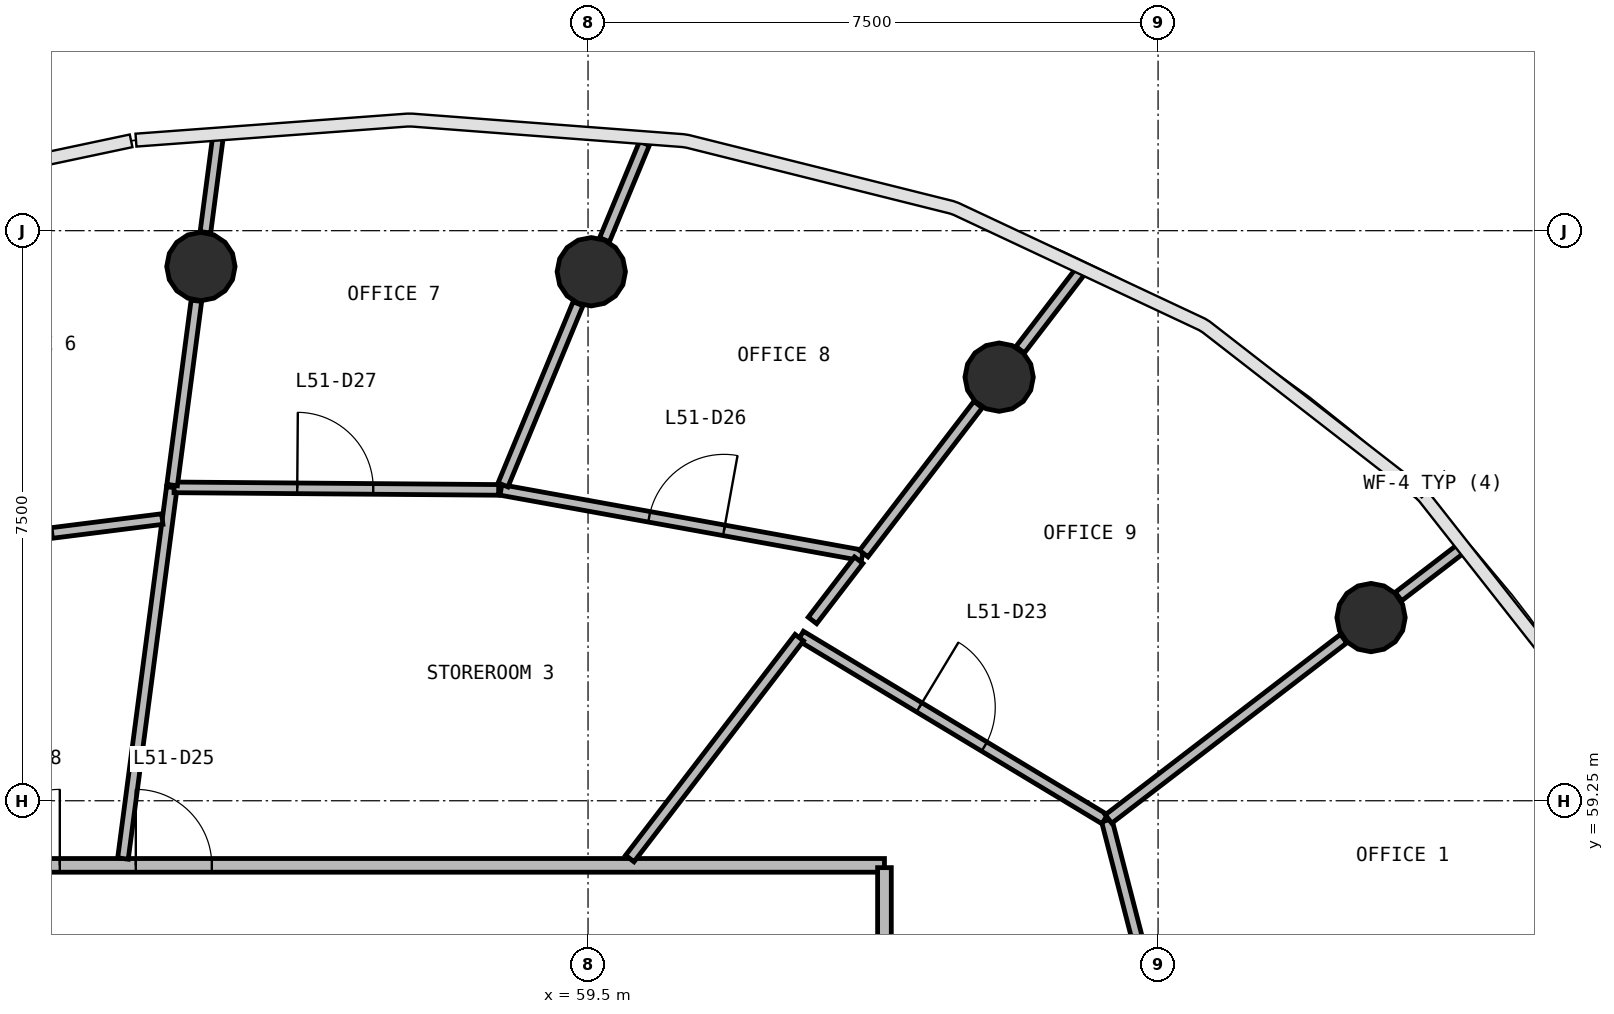
"""IFC4 building model, lengths in metres.
Left out: names, types, materials, properties, quantities, classifications, styles, units other than length and angle.
Written with IfcOpenShell. Run it as: python <this file> out.ifc"""

import sys

from ifc_helpers import new_model, si_unit, direction, frame, frame_2d, origin, origin_2d, place, context, subcontext, project, spatial, rectangle, circle, extrude, source, transform, mapped, element, fill, save


model = new_model("IFC4")
c1 = context("Model", 3, precision=1e-05, world=origin(), true_north=direction((0.0, 1.0)))
c2 = subcontext(c1, "Body", "Model", "MODEL_VIEW")
j1 = project(units=[si_unit("LENGTHUNIT", "METRE"), si_unit("PLANEANGLEUNIT", "RADIAN")], contexts=[c1])
p1 = place(None, origin())
s1 = spatial("IfcSite", under=j1, at=p1, CompositionType="ELEMENT")
p2 = place(p1, origin())
s2 = spatial("IfcBuilding", under=s1, at=p2, CompositionType="ELEMENT")
p3 = place(p2, frame((0.0, 0.0, 211.1)))
s3 = spatial("IfcBuildingStorey", under=s2, at=p3, CompositionType="ELEMENT", Elevation=211.1)
m1 = source(origin(), c2, "Body", "SweptSolid", [
    extrude(circle(Radius=0.45, at=origin_2d()), origin(), (0.0, 0.0, 1.0), 3.9),
])
for number, where, z_axis, x_axis in (
    (1, (69.802, 61.66, 0.0), (0.0, 0.0, 1.0), (1.0, 0.0, 0.0)),
    (2, (64.909, 64.823, 0.0), (0.0, 0.0, 1.0), (1.0, 0.0, 0.0)),
    (3, (59.543, 66.21, 0.0), (0.0, 0.0, 1.0), (1.0, 0.0, 0.0)),
    (4, (54.406, 66.278, 0.0), (0.0, 0.0, 1.0), (1.0, 0.0, 0.0)),
):
    element("IfcColumn", number, at=place(p3, frame(where, z_axis=z_axis, x_axis=x_axis)), inside=s3, PredefinedType="COLUMN", context=c2, shape_type="MappedRepresentation", body=[
        mapped(m1, transform((0.0, 0.0, 0.0), scale=1.0)),
    ])
p4 = place(p3, frame((40.6, 58.4, 0.0), z_axis=(0.0, 0.0, 1.0), x_axis=(1.0, 0.0, 0.0)))
e5 = element("IfcWall", 5, at=p4, inside=s3, PredefinedType="PARTITIONING", context=c2, shape_type="SweptSolid", body=[
    extrude(rectangle(XDim=22.8, YDim=0.18, at=frame_2d((11.4, 0.0))), origin(), (0.0, 0.0, 1.0), 2.88),
])
p5 = place(p4, frame((12.95, 0.0, 0.0)))
e6 = element("IfcOpeningElement", 6, at=p5, cuts=e5, PredefinedType="OPENING", context=c2, shape_type="SweptSolid", body=[
    extrude(rectangle(XDim=1.0, YDim=2.1, at=frame_2d((0.5, 1.05))), frame((0.0, 0.1, 0.0), z_axis=(0.0, -1.0, 0.0), x_axis=(1.0, 0.0, 0.0)), (0.0, 0.0, 1.0), 0.2),
])
p6 = place(p4, frame((10.95, 0.0, 0.0)))
e7 = element("IfcOpeningElement", 7, at=p6, cuts=e5, PredefinedType="OPENING", context=c2, shape_type="SweptSolid", body=[
    extrude(rectangle(XDim=1.0, YDim=2.1, at=frame_2d((0.5, 1.05))), frame((0.0, 0.1, 0.0), z_axis=(0.0, -1.0, 0.0), x_axis=(1.0, 0.0, 0.0)), (0.0, 0.0, 1.0), 0.2),
])
p7 = place(p3, frame((63.4, 58.37, 0.0), z_axis=(0.0, 0.0, 1.0), x_axis=(0.0, -1.0, 0.0)))
e8 = element("IfcWall", 8, at=p7, inside=s3, PredefinedType="PARTITIONING", context=c2, shape_type="SweptSolid", body=[
    extrude(rectangle(XDim=20.74, YDim=0.18, at=frame_2d((10.37, 0.0))), origin(), (0.0, 0.0, 1.0), 2.88),
])
p8 = place(p7, frame((9.99, 0.0, 0.0)))
e9 = element("IfcOpeningElement", 9, at=p8, cuts=e8, PredefinedType="OPENING", context=c2, shape_type="SweptSolid", body=[
    extrude(rectangle(XDim=0.9, YDim=2.1, at=frame_2d((0.45, 1.05))), frame((0.0, 0.1, 0.0), z_axis=(0.0, -1.0, 0.0), x_axis=(1.0, 0.0, 0.0)), (0.0, 0.0, 1.0), 0.2),
])
p9 = place(p7, frame((7.79, 0.0, 0.0)))
e10 = element("IfcOpeningElement", 10, at=p9, cuts=e8, PredefinedType="OPENING", context=c2, shape_type="SweptSolid", body=[
    extrude(rectangle(XDim=0.9, YDim=2.1, at=frame_2d((0.45, 1.05))), frame((0.0, 0.1, 0.0), z_axis=(0.0, -1.0, 0.0), x_axis=(1.0, 0.0, 0.0)), (0.0, 0.0, 1.0), 0.2),
])
p10 = place(p7, frame((4.29, 0.0, 0.0)))
e11 = element("IfcOpeningElement", 11, at=p10, cuts=e8, PredefinedType="OPENING", context=c2, shape_type="SweptSolid", body=[
    extrude(rectangle(XDim=1.0, YDim=2.1, at=frame_2d((0.5, 1.05))), frame((0.0, 0.1, 0.0), z_axis=(0.0, -1.0, 0.0), x_axis=(1.0, 0.0, 0.0)), (0.0, 0.0, 1.0), 0.2),
])
p11 = place(p7, frame((15.49, 0.0, 0.0)))
e12 = element("IfcOpeningElement", 12, at=p11, cuts=e8, PredefinedType="OPENING", context=c2, shape_type="SweptSolid", body=[
    extrude(rectangle(XDim=1.0, YDim=2.1, at=frame_2d((0.5, 1.05))), frame((0.0, 0.1, 0.0), z_axis=(0.0, -1.0, 0.0), x_axis=(1.0, 0.0, 0.0)), (0.0, 0.0, 1.0), 0.2),
])
p12 = place(p7, frame((12.09, 0.0, 0.0)))
e13 = element("IfcOpeningElement", 13, at=p12, cuts=e8, PredefinedType="OPENING", context=c2, shape_type="SweptSolid", body=[
    extrude(rectangle(XDim=1.0, YDim=2.1, at=frame_2d((0.5, 1.05))), frame((0.0, 0.1, 0.0), z_axis=(0.0, -1.0, 0.0), x_axis=(1.0, 0.0, 0.0)), (0.0, 0.0, 1.0), 0.2),
])
p13 = place(p3, frame((53.381, 58.49, 0.0), z_axis=(0.0, 0.0, 1.0), x_axis=(0.130510929427, 0.991446870639, 0.0)))
e14 = element("IfcWall", 14, at=p13, inside=s3, PredefinedType="PARTITIONING", context=c2, shape_type="SweptSolid", body=[
    extrude(rectangle(XDim=4.926, YDim=0.14, at=frame_2d((2.463, 0.0))), origin(), (0.0, 0.0, 1.0), 2.88),
])
p14 = place(p3, frame((58.354, 63.339, 0.0), z_axis=(0.0, 0.0, 1.0), x_axis=(0.983980456021, -0.178276364581, 0.0)))
e15 = element("IfcWall", 15, at=p14, inside=s3, PredefinedType="PARTITIONING", context=c2, shape_type="SweptSolid", body=[
    extrude(rectangle(XDim=4.833, YDim=0.14, at=frame_2d((2.417, 0.0))), origin(), (0.0, 0.0, 1.0), 2.88),
])
p15 = place(p14, frame((1.983, 0.0, 0.0)))
e16 = element("IfcOpeningElement", 16, at=p15, cuts=e15, PredefinedType="OPENING", context=c2, shape_type="SweptSolid", body=[
    extrude(rectangle(XDim=1.0, YDim=2.1, at=frame_2d((0.5, 1.05))), frame((0.0, 0.08, 0.0), z_axis=(0.0, -1.0, 0.0), x_axis=(1.0, 0.0, 0.0)), (0.0, 0.0, 1.0), 0.16),
])
p16 = place(p3, frame((66.324, 58.991, 0.0), z_axis=(0.0, 0.0, 1.0), x_axis=(0.249819251726, -0.968292487561, 0.0)))
e17 = element("IfcWall", 17, at=p16, inside=s3, PredefinedType="PARTITIONING", context=c2, shape_type="SweptSolid", body=[
    extrude(rectangle(XDim=4.649, YDim=0.14, at=frame_2d((2.324, 0.0))), origin(), (0.0, 0.0, 1.0), 2.88),
])
p17 = place(p16, frame((1.799, 0.0, 0.0)))
e18 = element("IfcOpeningElement", 18, at=p17, cuts=e17, PredefinedType="OPENING", context=c2, shape_type="SweptSolid", body=[
    extrude(rectangle(XDim=1.0, YDim=2.1, at=frame_2d((0.5, 1.05))), frame((0.0, 0.08, 0.0), z_axis=(0.0, -1.0, 0.0), x_axis=(1.0, 0.0, 0.0)), (0.0, 0.0, 1.0), 0.16),
])
p18 = place(p3, frame((62.298, 61.42, 0.0), z_axis=(0.0, 0.0, 1.0), x_axis=(0.856310382511, -0.516461546298, 0.0)))
e19 = element("IfcWall", 19, at=p18, inside=s3, PredefinedType="PARTITIONING", context=c2, shape_type="SweptSolid", body=[
    extrude(rectangle(XDim=4.672, YDim=0.14, at=frame_2d((2.336, 0.0))), origin(), (0.0, 0.0, 1.0), 2.88),
])
p19 = place(p18, frame((1.823, 0.0, 0.0)))
e20 = element("IfcOpeningElement", 20, at=p19, cuts=e19, PredefinedType="OPENING", context=c2, shape_type="SweptSolid", body=[
    extrude(rectangle(XDim=1.0, YDim=2.1, at=frame_2d((0.5, 1.05))), frame((0.0, 0.08, 0.0), z_axis=(0.0, -1.0, 0.0), x_axis=(1.0, 0.0, 0.0)), (0.0, 0.0, 1.0), 0.16),
])
p20 = place(p3, frame((54.054, 63.373, 0.0), z_axis=(0.0, 0.0, 1.0), x_axis=(0.999969319587, -0.007833255005, 0.0)))
e21 = element("IfcWall", 21, at=p20, inside=s3, PredefinedType="PARTITIONING", context=c2, shape_type="SweptSolid", body=[
    extrude(rectangle(XDim=4.27, YDim=0.14, at=frame_2d((2.135, 0.0))), origin(), (0.0, 0.0, 1.0), 2.88),
])
p21 = place(p20, frame((1.62, 0.0, 0.0)))
e22 = element("IfcOpeningElement", 22, at=p21, cuts=e21, PredefinedType="OPENING", context=c2, shape_type="SweptSolid", body=[
    extrude(rectangle(XDim=1.0, YDim=2.1, at=frame_2d((0.5, 1.05))), frame((0.0, 0.08, 0.0), z_axis=(0.0, -1.0, 0.0), x_axis=(1.0, 0.0, 0.0)), (0.0, 0.0, 1.0), 0.16),
])
p22 = place(p3, frame((66.348, 59.01, 0.0), z_axis=(0.0, 0.0, 1.0), x_axis=(0.793347300472, 0.608769300173, 0.0)))
e23 = element("IfcWall", 23, at=p22, inside=s3, PredefinedType="PARTITIONING", context=c2, shape_type="SweptSolid", body=[
    extrude(rectangle(XDim=3.899, YDim=0.14, at=frame_2d((1.95, 0.0))), origin(), (0.0, 0.0, 1.0), 2.88),
])
p23 = place(p3, frame((50.094, 62.476, 0.0), z_axis=(0.0, 0.0, 1.0), x_axis=(0.99213420041, 0.12517878565, 0.0)))
e24 = element("IfcWall", 24, at=p23, inside=s3, PredefinedType="PARTITIONING", context=c2, shape_type="SweptSolid", body=[
    extrude(rectangle(XDim=3.834, YDim=0.14, at=frame_2d((1.917, 0.0))), origin(), (0.0, 0.0, 1.0), 2.88),
])
p24 = place(p23, frame((1.385, 0.0, 0.0)))
e25 = element("IfcOpeningElement", 25, at=p24, cuts=e24, PredefinedType="OPENING", context=c2, shape_type="SweptSolid", body=[
    extrude(rectangle(XDim=1.0, YDim=2.1, at=frame_2d((0.5, 1.05))), frame((0.0, 0.08, 0.0), z_axis=(0.0, -1.0, 0.0), x_axis=(1.0, 0.0, 0.0)), (0.0, 0.0, 1.0), 0.16),
])
p25 = place(p3, frame((60.049, 58.49, 0.0), z_axis=(0.0, 0.0, 1.0), x_axis=(0.60875050296, 0.793361724024, 0.0)))
e26 = element("IfcWall", 26, at=p25, inside=s3, PredefinedType="PARTITIONING", context=c2, shape_type="SweptSolid", body=[
    extrude(rectangle(XDim=3.663, YDim=0.14, at=frame_2d((1.832, 0.0))), origin(), (0.0, 0.0, 1.0), 2.88),
])
p26 = place(p3, frame((62.453, 61.622, 0.0), z_axis=(0.0, 0.0, 1.0), x_axis=(0.608872401912, 0.793268175455, 0.0)))
e27 = element("IfcWall", 27, at=p26, inside=s3, PredefinedType="PARTITIONING", context=c2, shape_type="SweptSolid", body=[
    extrude(rectangle(XDim=1.0, YDim=0.14, at=frame_2d((0.5, 0.0))), origin(), (0.0, 0.0, 1.0), 2.88),
])
p27 = place(p3, frame((63.127, 62.501, 0.0), z_axis=(0.0, 0.0, 1.0), x_axis=(0.608750837214, 0.793361467549, 0.0)))
e28 = element("IfcWall", 28, at=p27, inside=s3, PredefinedType="PARTITIONING", context=c2, shape_type="SweptSolid", body=[
    extrude(rectangle(XDim=2.472, YDim=0.14, at=frame_2d((1.236, 0.0))), origin(), (0.0, 0.0, 1.0), 2.88),
])
p28 = place(p3, frame((54.028, 63.403, 0.0), z_axis=(0.0, 0.0, 1.0), x_axis=(0.130581052229, 0.991437637373, 0.0)))
e29 = element("IfcWall", 29, at=p28, inside=s3, PredefinedType="PARTITIONING", context=c2, shape_type="SweptSolid", body=[
    extrude(rectangle(XDim=2.446, YDim=0.14, at=frame_2d((1.223, 0.0))), origin(), (0.0, 0.0, 1.0), 2.88),
])
p29 = place(p3, frame((58.381, 63.406, 0.0), z_axis=(0.0, 0.0, 1.0), x_axis=(0.382733405642, 0.923858831319, 0.0)))
e30 = element("IfcWall", 30, at=p29, inside=s3, PredefinedType="PARTITIONING", context=c2, shape_type="SweptSolid", body=[
    extrude(rectangle(XDim=2.58, YDim=0.14, at=frame_2d((1.29, 0.0))), origin(), (0.0, 0.0, 1.0), 2.88),
])
p30 = place(p3, frame((59.717, 66.63, 0.0), z_axis=(0.0, 0.0, 1.0), x_axis=(0.382733825207, 0.923858657502, 0.0)))
e31 = element("IfcWall", 31, at=p30, inside=s3, PredefinedType="PARTITIONING", context=c2, shape_type="SweptSolid", body=[
    extrude(rectangle(XDim=1.373, YDim=0.14, at=frame_2d((0.687, 0.0))), origin(), (0.0, 0.0, 1.0), 2.88),
])
p31 = place(p3, frame((65.186, 65.184, 0.0), z_axis=(0.0, 0.0, 1.0), x_axis=(0.608692849826, 0.79340595824, 0.0)))
e32 = element("IfcWall", 32, at=p31, inside=s3, PredefinedType="PARTITIONING", context=c2, shape_type="SweptSolid", body=[
    extrude(rectangle(XDim=1.334, YDim=0.14, at=frame_2d((0.667, 0.0))), origin(), (0.0, 0.0, 1.0), 2.88),
])
p32 = place(p3, frame((54.466, 66.729, 0.0), z_axis=(0.0, 0.0, 1.0), x_axis=(0.130520415919, 0.991445621821, 0.0)))
e33 = element("IfcWall", 33, at=p32, inside=s3, PredefinedType="PARTITIONING", context=c2, shape_type="SweptSolid", body=[
    extrude(rectangle(XDim=1.246, YDim=0.14, at=frame_2d((0.623, 0.0))), origin(), (0.0, 0.0, 1.0), 2.88),
])
p33 = place(p3, frame((70.163, 61.937, 0.0), z_axis=(0.0, 0.0, 1.0), x_axis=(0.793403619358, 0.608695898449, 0.0)))
e34 = element("IfcWall", 34, at=p33, inside=s3, PredefinedType="PARTITIONING", context=c2, shape_type="SweptSolid", body=[
    extrude(rectangle(XDim=1.047, YDim=0.14, at=frame_2d((0.523, 0.0))), origin(), (0.0, 0.0, 1.0), 2.88),
])
m2 = source(origin(), c2, "Body", "SweptSolid", [
    extrude(rectangle(XDim=1.0, YDim=2.1, at=frame_2d((0.5, 1.05))), frame((0.0, 0.025, 0.0), z_axis=(0.0, -1.0, 0.0), x_axis=(1.0, 0.0, 0.0)), (0.0, 0.0, 1.0), 0.05),
])
p34 = place(p19, origin())
e35 = element("IfcDoor", 35, at=p34, inside=s3, OperationType="SINGLE_SWING_LEFT", PredefinedType="DOOR", context=c2, shape_type="MappedRepresentation", body=[
    mapped(m2, transform((0.0, 0.0, 0.0), scale=1.0)),
])
fill(e20, e35)
p35 = place(p5, origin())
e36 = element("IfcDoor", 36, at=p35, inside=s3, OperationType="SINGLE_SWING_LEFT", PredefinedType="DOOR", context=c2, shape_type="MappedRepresentation", body=[
    mapped(m2, transform((0.0, 0.0, 0.0), scale=1.0)),
])
fill(e6, e36)
p36 = place(p15, origin())
e37 = element("IfcDoor", 37, at=p36, inside=s3, OperationType="SINGLE_SWING_RIGHT", PredefinedType="DOOR", context=c2, shape_type="MappedRepresentation", body=[
    mapped(m2, transform((0.0, 0.0, 0.0), scale=1.0)),
])
fill(e16, e37)
p37 = place(p21, origin())
e38 = element("IfcDoor", 38, at=p37, inside=s3, OperationType="SINGLE_SWING_LEFT", PredefinedType="DOOR", context=c2, shape_type="MappedRepresentation", body=[
    mapped(m2, transform((0.0, 0.0, 0.0), scale=1.0)),
])
fill(e22, e38)
p38 = place(p6, origin())
e39 = element("IfcDoor", 39, at=p38, inside=s3, OperationType="SINGLE_SWING_RIGHT", PredefinedType="DOOR", context=c2, shape_type="MappedRepresentation", body=[
    mapped(m2, transform((0.0, 0.0, 0.0), scale=1.0)),
])
fill(e7, e39)
p39 = place(p24, origin())
e40 = element("IfcDoor", 40, at=p39, inside=s3, OperationType="SINGLE_SWING_LEFT", PredefinedType="DOOR", context=c2, shape_type="MappedRepresentation", body=[
    mapped(m2, transform((0.0, 0.0, 0.0), scale=1.0)),
])
fill(e25, e40)
save(model, sys.argv[1])
